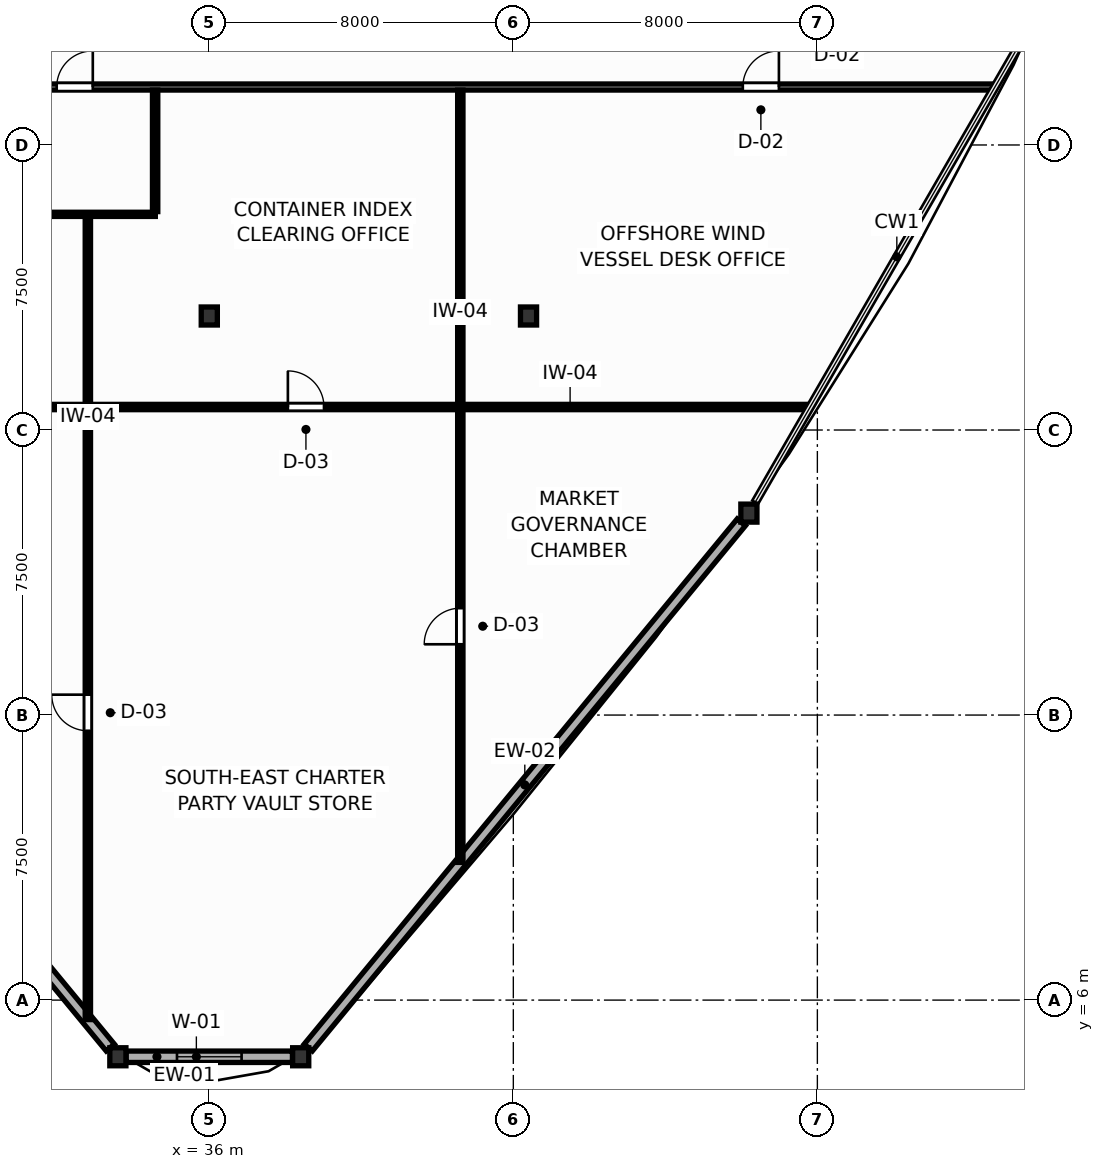
"""IFC4 building model, lengths in metres.
Left out: names, types, materials, properties, quantities, classifications, styles, units other than length and angle.
Written with IfcOpenShell. Run it as: python <this file> out.ifc"""

import sys

from ifc_helpers import new_model, si_unit, direction, frame, frame_2d, origin, origin_2d, place, context, subcontext, project, spatial, rectangle, i_section, extrude, source, transform, mapped, element, fill, save


model = new_model("IFC4")
c1 = context("Model", 3, precision=1e-05, world=origin(), true_north=direction((0.0, 1.0)))
c2 = subcontext(c1, "Body", "Model", "MODEL_VIEW")
j1 = project(units=[si_unit("LENGTHUNIT", "METRE"), si_unit("PLANEANGLEUNIT", "RADIAN")], contexts=[c1])
p1 = place(None, origin())
s1 = spatial("IfcSite", under=j1, at=p1, CompositionType="ELEMENT")
p2 = place(p1, origin())
s2 = spatial("IfcBuilding", under=s1, at=p2, CompositionType="ELEMENT")
p3 = place(p2, frame((0.0, 0.0, 55.2)))
s3 = spatial("IfcBuildingStorey", under=s2, at=p3, CompositionType="ELEMENT", Elevation=55.2)
m1 = source(origin(), c2, "Body", "SweptSolid", [
    extrude(i_section(OverallWidth=0.424, OverallDepth=0.474, WebThickness=0.045, FlangeThickness=0.072, FilletRadius=0.015, at=origin_2d()), origin(), (0.0, 0.0, 1.0), 3.9),
])
for number, where, z_axis, x_axis in (
    (1, (44.4, 24.0, 0.0), (0.0, 0.0, 1.0), (1.0, 0.0, 0.0)),
    (2, (36.0, 24.0, 0.0), (0.0, 0.0, 1.0), (1.0, 0.0, 0.0)),
    (3, (33.595, 4.509, 0.0), (0.0, 0.0, 1.0), (1.0, 0.0, 0.0)),
    (4, (38.405, 4.509, 0.0), (0.0, 0.0, 1.0), (1.0, 0.0, 0.0)),
    (5, (50.198, 18.813, 0.0), (0.0, 0.0, 1.0), (1.0, 0.0, 0.0)),
):
    element("IfcColumn", number, at=place(p3, frame(where, z_axis=z_axis, x_axis=x_axis)), inside=s3, PredefinedType="COLUMN", context=c2, shape_type="MappedRepresentation", body=[
        mapped(m1, transform((0.0, 0.0, 0.0), scale=1.0)),
    ])
p4 = place(p3, frame((22.001, 18.572, 0.0), z_axis=(0.0, 0.0, 1.0), x_axis=(0.636134749951, -0.771577980443, 0.0)))
e6 = element("IfcWall", 6, at=p4, inside=s3, PredefinedType="SOLIDWALL", context=c2, shape_type="SweptSolid", body=[
    extrude(rectangle(XDim=17.912, YDim=0.28, at=frame_2d((8.956, 0.0))), origin(), (0.0, 0.0, 1.0), 3.11),
])
p5 = place(p3, frame((33.812, 4.509, 0.0), z_axis=(0.0, 0.0, 1.0), x_axis=(1.0, 0.0, 0.0)))
e7 = element("IfcWall", 7, at=p5, inside=s3, PredefinedType="SOLIDWALL", context=c2, shape_type="SweptSolid", body=[
    extrude(rectangle(XDim=4.376, YDim=0.3, at=frame_2d((2.188, 0.0))), origin(), (0.0, 0.0, 1.0), 3.11),
])
p6 = place(p5, frame((1.338, 0.0, 0.75)))
e8 = element("IfcOpeningElement", 8, at=p6, cuts=e7, PredefinedType="OPENING", context=c2, shape_type="SweptSolid", body=[
    extrude(rectangle(XDim=1.7, YDim=1.75, at=frame_2d((0.85, 0.875))), frame((0.0, 0.16, 0.0), z_axis=(0.0, -1.0, 0.0), x_axis=(1.0, 0.0, 0.0)), (0.0, 0.0, 1.0), 0.32),
])
p7 = place(p3, frame((38.605, 4.751, 0.0), z_axis=(0.0, 0.0, 1.0), x_axis=(0.636134749951, 0.771577980443, 0.0)))
e9 = element("IfcWall", 9, at=p7, inside=s3, PredefinedType="SOLIDWALL", context=c2, shape_type="SweptSolid", body=[
    extrude(rectangle(XDim=17.912, YDim=0.28, at=frame_2d((8.956, 0.0))), origin(), (0.0, 0.0, 1.0), 3.11),
])
p8 = place(p3, frame((15.348, 30.025, 0.0), z_axis=(0.0, 0.0, 1.0), x_axis=(1.0, 0.0, 0.0)))
e10 = element("IfcWall", 10, at=p8, inside=s3, PredefinedType="PARTITIONING", context=c2, shape_type="SweptSolid", body=[
    extrude(rectangle(XDim=41.303, YDim=0.16, at=frame_2d((20.652, 0.0))), origin(), (0.0, 0.0, 1.0), 3.56),
])
p9 = place(p8, frame((16.636, 0.0, 0.0)))
e11 = element("IfcOpeningElement", 11, at=p9, cuts=e10, PredefinedType="OPENING", context=c2, shape_type="SweptSolid", body=[
    extrude(rectangle(XDim=0.95, YDim=2.05, at=frame_2d((0.475, 1.025))), frame((0.0, 0.09, 0.0), z_axis=(0.0, -1.0, 0.0), x_axis=(1.0, 0.0, 0.0)), (0.0, 0.0, 1.0), 0.18),
])
p10 = place(p8, frame((4.12, 0.0, 0.0)))
e12 = element("IfcOpeningElement", 12, at=p10, cuts=e10, PredefinedType="OPENING", context=c2, shape_type="SweptSolid", body=[
    extrude(rectangle(XDim=0.95, YDim=2.05, at=frame_2d((0.475, 1.025))), frame((0.0, 0.09, 0.0), z_axis=(0.0, -1.0, 0.0), x_axis=(1.0, 0.0, 0.0)), (0.0, 0.0, 1.0), 0.18),
])
p11 = place(p8, frame((34.69, 0.0, 0.0)))
e13 = element("IfcOpeningElement", 13, at=p11, cuts=e10, PredefinedType="OPENING", context=c2, shape_type="SweptSolid", body=[
    extrude(rectangle(XDim=0.95, YDim=2.05, at=frame_2d((0.475, 1.025))), frame((0.0, 0.09, 0.0), z_axis=(0.0, -1.0, 0.0), x_axis=(1.0, 0.0, 0.0)), (0.0, 0.0, 1.0), 0.18),
])
p12 = place(p3, frame((24.39, 21.605, 0.0), z_axis=(0.0, 0.0, 1.0), x_axis=(1.0, 0.0, 0.0)))
e14 = element("IfcWall", 14, at=p12, inside=s3, PredefinedType="PARTITIONING", context=c2, shape_type="SweptSolid", body=[
    extrude(rectangle(XDim=27.4, YDim=0.14, at=frame_2d((13.7, 0.0))), origin(), (0.0, 0.0, 1.0), 3.56),
])
p13 = place(p12, frame((5.36, 0.0, 0.0)))
e15 = element("IfcOpeningElement", 15, at=p13, cuts=e14, PredefinedType="OPENING", context=c2, shape_type="SweptSolid", body=[
    extrude(rectangle(XDim=0.95, YDim=2.05, at=frame_2d((0.475, 1.025))), frame((0.0, 0.08, 0.0), z_axis=(0.0, -1.0, 0.0), x_axis=(1.0, 0.0, 0.0)), (0.0, 0.0, 1.0), 0.16),
])
p14 = place(p12, frame((13.678, 0.0, 0.0)))
e16 = element("IfcOpeningElement", 16, at=p14, cuts=e14, PredefinedType="OPENING", context=c2, shape_type="SweptSolid", body=[
    extrude(rectangle(XDim=0.95, YDim=2.05, at=frame_2d((0.475, 1.025))), frame((0.0, 0.08, 0.0), z_axis=(0.0, -1.0, 0.0), x_axis=(1.0, 0.0, 0.0)), (0.0, 0.0, 1.0), 0.16),
])
p15 = place(p3, frame((32.805, 5.487, 0.0), z_axis=(0.0, 0.0, 1.0), x_axis=(0.0, 1.0, 0.0)))
e17 = element("IfcWall", 17, at=p15, inside=s3, PredefinedType="PARTITIONING", context=c2, shape_type="SweptSolid", body=[
    extrude(rectangle(XDim=21.203, YDim=0.14, at=frame_2d((10.602, 0.0))), origin(), (0.0, 0.0, 1.0), 3.56),
])
p16 = place(p15, frame((7.6, 0.0, 0.0)))
e18 = element("IfcOpeningElement", 18, at=p16, cuts=e17, PredefinedType="OPENING", context=c2, shape_type="SweptSolid", body=[
    extrude(rectangle(XDim=0.95, YDim=2.05, at=frame_2d((0.475, 1.025))), frame((0.0, 0.08, 0.0), z_axis=(0.0, -1.0, 0.0), x_axis=(1.0, 0.0, 0.0)), (0.0, 0.0, 1.0), 0.16),
])
p17 = place(p3, frame((42.605, 9.623, 0.0), z_axis=(0.0, 0.0, 1.0), x_axis=(0.0, 1.0, 0.0)))
e19 = element("IfcWall", 19, at=p17, inside=s3, PredefinedType="PARTITIONING", context=c2, shape_type="SweptSolid", body=[
    extrude(rectangle(XDim=20.32, YDim=0.14, at=frame_2d((10.16, 0.0))), origin(), (0.0, 0.0, 1.0), 3.56),
])
p18 = place(p17, frame((5.74, 0.0, 0.0)))
e20 = element("IfcOpeningElement", 20, at=p18, cuts=e19, PredefinedType="OPENING", context=c2, shape_type="SweptSolid", body=[
    extrude(rectangle(XDim=0.95, YDim=2.05, at=frame_2d((0.475, 1.025))), frame((0.0, 0.08, 0.0), z_axis=(0.0, -1.0, 0.0), x_axis=(1.0, 0.0, 0.0)), (0.0, 0.0, 1.0), 0.16),
])
p19 = place(p3, frame((30.34, 26.675, 0.0), z_axis=(0.0, 0.0, 1.0), x_axis=(1.0, 0.0, 0.0)))
e21 = element("IfcWall", 21, at=p19, inside=s3, PredefinedType="MOVABLE", context=c2, shape_type="SweptSolid", body=[
    extrude(rectangle(XDim=4.24, YDim=0.11, at=frame_2d((2.12, 0.0))), origin(), (0.0, 0.0, 1.0), 3.56),
])
p20 = place(p3, frame((34.575, 26.747, 0.0), z_axis=(0.0, 0.0, 1.0), x_axis=(0.0, 1.0, 0.0)))
e22 = element("IfcWall", 22, at=p20, inside=s3, PredefinedType="PARTITIONING", context=c2, shape_type="SweptSolid", body=[
    extrude(rectangle(XDim=3.196, YDim=0.14, at=frame_2d((1.598, 0.0))), origin(), (0.0, 0.0, 1.0), 3.56),
])
p21 = place(p6, origin())
e23 = element("IfcWindow", 23, at=p21, inside=s3, PartitioningType="SINGLE_PANEL", PredefinedType="WINDOW", context=c2, shape_type="SweptSolid", body=[
    extrude(rectangle(XDim=1.7, YDim=1.75, at=frame_2d((0.85, 0.875))), frame((0.0, 0.03, 0.0), z_axis=(0.0, -1.0, 0.0), x_axis=(1.0, 0.0, 0.0)), (0.0, 0.0, 1.0), 0.06),
])
fill(e8, e23)
p22 = place(p9, origin())
e24 = element("IfcDoor", 24, at=p22, inside=s3, OperationType="SINGLE_SWING_RIGHT", PredefinedType="DOOR", context=c2, shape_type="SweptSolid", body=[
    extrude(rectangle(XDim=0.95, YDim=2.05, at=frame_2d((0.475, 1.025))), frame((0.0, 0.025, 0.0), z_axis=(0.0, -1.0, 0.0), x_axis=(1.0, 0.0, 0.0)), (0.0, 0.0, 1.0), 0.05),
])
fill(e11, e24)
p23 = place(p11, origin())
e25 = element("IfcDoor", 25, at=p23, inside=s3, OperationType="SINGLE_SWING_RIGHT", PredefinedType="DOOR", context=c2, shape_type="SweptSolid", body=[
    extrude(rectangle(XDim=0.95, YDim=2.05, at=frame_2d((0.475, 1.025))), frame((0.0, 0.025, 0.0), z_axis=(0.0, -1.0, 0.0), x_axis=(1.0, 0.0, 0.0)), (0.0, 0.0, 1.0), 0.05),
])
fill(e13, e25)
p24 = place(p14, origin())
e26 = element("IfcDoor", 26, at=p24, inside=s3, OperationType="SINGLE_SWING_LEFT", PredefinedType="DOOR", context=c2, shape_type="SweptSolid", body=[
    extrude(rectangle(XDim=0.95, YDim=2.05, at=frame_2d((0.475, 1.025))), frame((0.0, 0.025, 0.0), z_axis=(0.0, -1.0, 0.0), x_axis=(1.0, 0.0, 0.0)), (0.0, 0.0, 1.0), 0.05),
])
fill(e16, e26)
p25 = place(p16, origin())
e27 = element("IfcDoor", 27, at=p25, inside=s3, OperationType="SINGLE_SWING_RIGHT", PredefinedType="DOOR", context=c2, shape_type="SweptSolid", body=[
    extrude(rectangle(XDim=0.95, YDim=2.05, at=frame_2d((0.475, 1.025))), frame((0.0, 0.025, 0.0), z_axis=(0.0, -1.0, 0.0), x_axis=(1.0, 0.0, 0.0)), (0.0, 0.0, 1.0), 0.05),
])
fill(e18, e27)
p26 = place(p18, origin())
e28 = element("IfcDoor", 28, at=p26, inside=s3, OperationType="SINGLE_SWING_LEFT", PredefinedType="DOOR", context=c2, shape_type="SweptSolid", body=[
    extrude(rectangle(XDim=0.95, YDim=2.05, at=frame_2d((0.475, 1.025))), frame((0.0, 0.025, 0.0), z_axis=(0.0, -1.0, 0.0), x_axis=(1.0, 0.0, 0.0)), (0.0, 0.0, 1.0), 0.05),
])
fill(e20, e28)
save(model, sys.argv[1])
